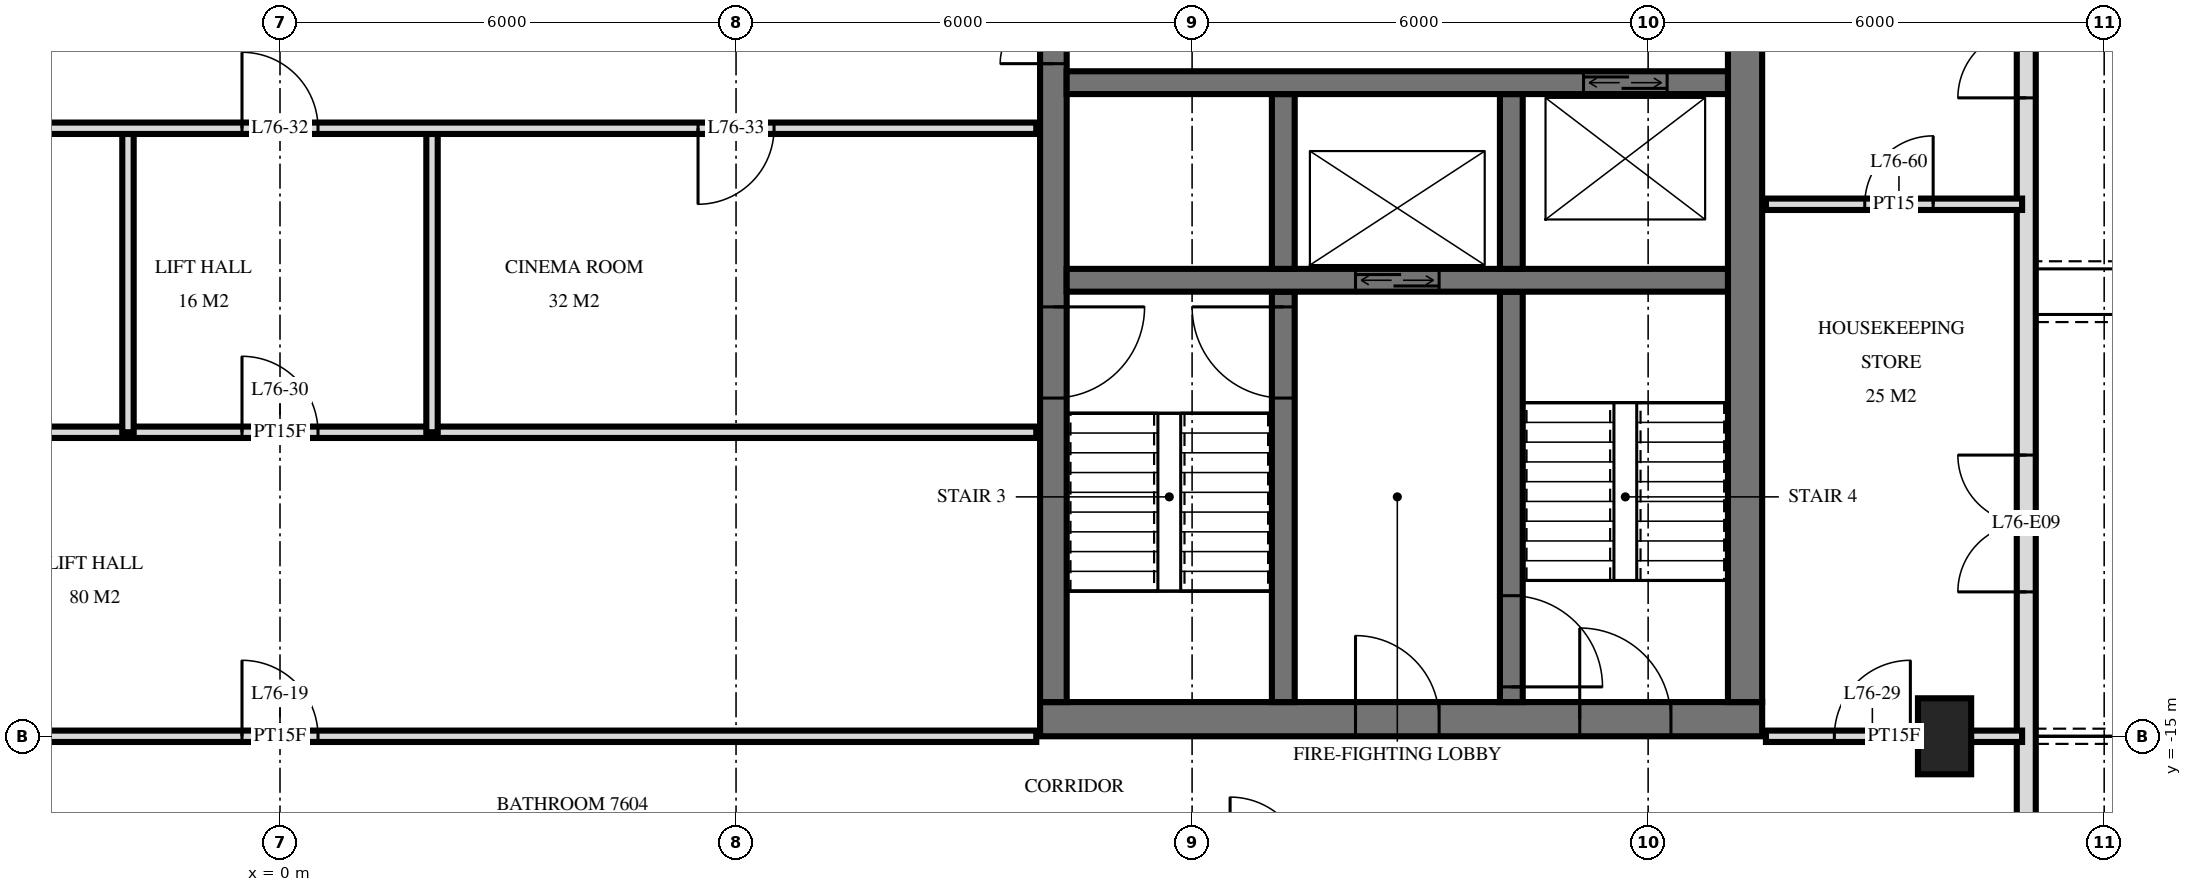
"""IFC4 building model, lengths in metres.
Left out: names, types, materials, properties, quantities, classifications, styles, units other than length and angle.
Written with IfcOpenShell. Run it as: python <this file> out.ifc"""

import sys

from ifc_helpers import new_model, si_unit, direction, frame, frame_2d, origin, origin_2d, place, context, subcontext, project, spatial, rectangle, extrude, element, fill, save


model = new_model("IFC4")
c1 = context("Model", 3, precision=1e-05, world=origin(), true_north=direction((0.0, 1.0)))
c2 = subcontext(c1, "Body", "Model", "MODEL_VIEW")
j1 = project(units=[si_unit("LENGTHUNIT", "METRE"), si_unit("PLANEANGLEUNIT", "RADIAN")], contexts=[c1])
p1 = place(None, origin())
s1 = spatial("IfcSite", under=j1, at=p1, CompositionType="ELEMENT")
p2 = place(p1, origin())
s2 = spatial("IfcBuilding", under=s1, at=p2, CompositionType="ELEMENT")
p3 = place(p2, frame((0.0, 0.0, 287.6)))
s3 = spatial("IfcBuildingStorey", under=s2, at=p3, CompositionType="ELEMENT", Elevation=287.6)
p4 = place(p3, frame((21.9, -15.0, 0.0), z_axis=(0.0, 0.0, 1.0), x_axis=(0.0, 1.0, 0.0)))
e1 = element("IfcColumn", 1, at=p4, inside=s3, PredefinedType="COLUMN", context=c2, shape_type="SweptSolid", body=[
    extrude(rectangle(XDim=1.0, YDim=0.7, at=origin_2d()), origin(), (0.0, 0.0, 1.0), 3.5),
])
p5 = place(p3, frame((10.0, -14.775, 0.0), z_axis=(0.0, 0.0, 1.0), x_axis=(1.0, 0.0, 0.0)))
e2 = element("IfcWall", 2, at=p5, inside=s3, PredefinedType="SHEAR", context=c2, shape_type="SweptSolid", body=[
    extrude(rectangle(XDim=9.5, YDim=0.45, at=frame_2d((4.75, 0.0))), origin(), (0.0, 0.0, 1.0), 3.5),
])
p6 = place(p5, frame((7.1, 0.0, 0.0)))
e3 = element("IfcOpeningElement", 3, at=p6, cuts=e2, PredefinedType="OPENING", context=c2, shape_type="SweptSolid", body=[
    extrude(rectangle(XDim=1.2, YDim=2.1, at=frame_2d((0.6, 1.05))), frame((0.0, 0.235, 0.0), z_axis=(0.0, -1.0, 0.0), x_axis=(1.0, 0.0, 0.0)), (0.0, 0.0, 1.0), 0.47),
])
p7 = place(p5, frame((4.15, 0.0, 0.0)))
e4 = element("IfcOpeningElement", 4, at=p7, cuts=e2, PredefinedType="OPENING", context=c2, shape_type="SweptSolid", body=[
    extrude(rectangle(XDim=1.1, YDim=2.1, at=frame_2d((0.55, 1.05))), frame((0.0, 0.235, 0.0), z_axis=(0.0, -1.0, 0.0), x_axis=(1.0, 0.0, 0.0)), (0.0, 0.0, 1.0), 0.47),
])
p8 = place(p3, frame((10.175, -14.55, 0.0), z_axis=(0.0, 0.0, 1.0), x_axis=(0.0, 1.0, 0.0)))
e5 = element("IfcWall", 5, at=p8, inside=s3, PredefinedType="SHEAR", context=c2, shape_type="SweptSolid", body=[
    extrude(rectangle(XDim=14.1, YDim=0.35, at=frame_2d((7.05, 0.0))), origin(), (0.0, 0.0, 1.0), 3.5),
])
p9 = place(p8, frame((8.4, 0.0, 0.0)))
e6 = element("IfcOpeningElement", 6, at=p9, cuts=e5, PredefinedType="OPENING", context=c2, shape_type="SweptSolid", body=[
    extrude(rectangle(XDim=1.4, YDim=2.4, at=frame_2d((0.7, 1.2))), frame((0.0, 0.185, 0.0), z_axis=(0.0, -1.0, 0.0), x_axis=(1.0, 0.0, 0.0)), (0.0, 0.0, 1.0), 0.37),
])
p10 = place(p8, frame((10.0, 0.0, 0.0)))
e7 = element("IfcOpeningElement", 7, at=p10, cuts=e5, PredefinedType="OPENING", context=c2, shape_type="SweptSolid", body=[
    extrude(rectangle(XDim=1.4, YDim=2.4, at=frame_2d((0.7, 1.2))), frame((0.0, 0.185, 0.0), z_axis=(0.0, -1.0, 0.0), x_axis=(1.0, 0.0, 0.0)), (0.0, 0.0, 1.0), 0.37),
])
p11 = place(p8, frame((4.0, 0.0, 0.0)))
e8 = element("IfcOpeningElement", 8, at=p11, cuts=e5, PredefinedType="OPENING", context=c2, shape_type="SweptSolid", body=[
    extrude(rectangle(XDim=1.2, YDim=2.1, at=frame_2d((0.6, 1.05))), frame((0.0, 0.185, 0.0), z_axis=(0.0, -1.0, 0.0), x_axis=(1.0, 0.0, 0.0)), (0.0, 0.0, 1.0), 0.37),
])
p12 = place(p3, frame((19.275, -14.55, 0.0), z_axis=(0.0, 0.0, 1.0), x_axis=(0.0, 1.0, 0.0)))
e9 = element("IfcWall", 9, at=p12, inside=s3, PredefinedType="SHEAR", context=c2, shape_type="SweptSolid", body=[
    extrude(rectangle(XDim=14.1, YDim=0.45, at=frame_2d((7.05, 0.0))), origin(), (0.0, 0.0, 1.0), 3.5),
])
p13 = place(p3, frame((10.35, -6.4, 0.0), z_axis=(0.0, 0.0, 1.0), x_axis=(1.0, 0.0, 0.0)))
e10 = element("IfcWall", 10, at=p13, inside=s3, PredefinedType="SHEAR", context=c2, shape_type="SweptSolid", body=[
    extrude(rectangle(XDim=8.7, YDim=0.3, at=frame_2d((4.35, 0.0))), origin(), (0.0, 0.0, 1.0), 3.5),
])
p14 = place(p13, frame((6.8, 0.0, 0.0)))
e11 = element("IfcOpeningElement", 11, at=p14, cuts=e10, PredefinedType="OPENING", context=c2, shape_type="SweptSolid", body=[
    extrude(rectangle(XDim=1.1, YDim=2.1, at=frame_2d((0.55, 1.05))), frame((0.0, 0.16, 0.0), z_axis=(0.0, -1.0, 0.0), x_axis=(1.0, 0.0, 0.0)), (0.0, 0.0, 1.0), 0.32),
])
p15 = place(p3, frame((10.35, -9.0, 0.0), z_axis=(0.0, 0.0, 1.0), x_axis=(1.0, 0.0, 0.0)))
e12 = element("IfcWall", 12, at=p15, inside=s3, PredefinedType="SHEAR", context=c2, shape_type="SweptSolid", body=[
    extrude(rectangle(XDim=8.7, YDim=0.3, at=frame_2d((4.35, 0.0))), origin(), (0.0, 0.0, 1.0), 3.5),
])
p16 = place(p15, frame((3.8, 0.0, 0.0)))
e13 = element("IfcOpeningElement", 13, at=p16, cuts=e12, PredefinedType="OPENING", context=c2, shape_type="SweptSolid", body=[
    extrude(rectangle(XDim=1.1, YDim=2.1, at=frame_2d((0.55, 1.05))), frame((0.0, 0.16, 0.0), z_axis=(0.0, -1.0, 0.0), x_axis=(1.0, 0.0, 0.0)), (0.0, 0.0, 1.0), 0.32),
])
p17 = place(p3, frame((13.2, -8.85, 0.0), z_axis=(0.0, 0.0, 1.0), x_axis=(0.0, 1.0, 0.0)))
e14 = element("IfcWall", 14, at=p17, inside=s3, PredefinedType="SHEAR", context=c2, shape_type="SweptSolid", body=[
    extrude(rectangle(XDim=2.3, YDim=0.3, at=frame_2d((1.15, 0.0))), origin(), (0.0, 0.0, 1.0), 3.5),
])
p18 = place(p3, frame((13.2, -14.55, 0.0), z_axis=(0.0, 0.0, 1.0), x_axis=(0.0, 1.0, 0.0)))
e15 = element("IfcWall", 15, at=p18, inside=s3, PredefinedType="SHEAR", context=c2, shape_type="SweptSolid", body=[
    extrude(rectangle(XDim=5.4, YDim=0.3, at=frame_2d((2.7, 0.0))), origin(), (0.0, 0.0, 1.0), 3.5),
])
p19 = place(p18, frame((4.0, 0.0, 0.0)))
e16 = element("IfcOpeningElement", 16, at=p19, cuts=e15, PredefinedType="OPENING", context=c2, shape_type="SweptSolid", body=[
    extrude(rectangle(XDim=1.2, YDim=2.1, at=frame_2d((0.6, 1.05))), frame((0.0, 0.16, 0.0), z_axis=(0.0, -1.0, 0.0), x_axis=(1.0, 0.0, 0.0)), (0.0, 0.0, 1.0), 0.32),
])
p20 = place(p3, frame((16.2, -8.85, 0.0), z_axis=(0.0, 0.0, 1.0), x_axis=(0.0, 1.0, 0.0)))
e17 = element("IfcWall", 17, at=p20, inside=s3, PredefinedType="SHEAR", context=c2, shape_type="SweptSolid", body=[
    extrude(rectangle(XDim=2.3, YDim=0.3, at=frame_2d((1.15, 0.0))), origin(), (0.0, 0.0, 1.0), 3.5),
])
p21 = place(p3, frame((16.2, -14.55, 0.0), z_axis=(0.0, 0.0, 1.0), x_axis=(0.0, 1.0, 0.0)))
e18 = element("IfcWall", 18, at=p21, inside=s3, PredefinedType="SHEAR", context=c2, shape_type="SweptSolid", body=[
    extrude(rectangle(XDim=5.4, YDim=0.3, at=frame_2d((2.7, 0.0))), origin(), (0.0, 0.0, 1.0), 3.5),
])
p22 = place(p21, frame((0.2, 0.0, 0.0)))
e19 = element("IfcOpeningElement", 19, at=p22, cuts=e18, PredefinedType="OPENING", context=c2, shape_type="SweptSolid", body=[
    extrude(rectangle(XDim=1.2, YDim=2.1, at=frame_2d((0.6, 1.05))), frame((0.0, 0.16, 0.0), z_axis=(0.0, -1.0, 0.0), x_axis=(1.0, 0.0, 0.0)), (0.0, 0.0, 1.0), 0.32),
])
p23 = place(p3, frame((22.975, -29.275, 0.0), z_axis=(0.0, 0.0, 1.0), x_axis=(0.0, 1.0, 0.0)))
e20 = element("IfcWall", 20, at=p23, inside=s3, PredefinedType="SOLIDWALL", context=c2, shape_type="SweptSolid", body=[
    extrude(rectangle(XDim=25.951, YDim=0.25, at=frame_2d((12.975, 0.0))), origin(), (0.0, 0.0, 1.0), 3.22),
])
p24 = place(p23, frame((0.575, 0.0, 0.0)))
e21 = element("IfcOpeningElement", 21, at=p24, cuts=e20, PredefinedType="OPENING", context=c2, shape_type="SweptSolid", body=[
    extrude(rectangle(XDim=1.8, YDim=2.4, at=frame_2d((0.9, 1.2))), frame((0.0, 0.135, 0.0), z_axis=(0.0, -1.0, 0.0), x_axis=(1.0, 0.0, 0.0)), (0.0, 0.0, 1.0), 0.27),
])
p25 = place(p23, frame((3.325, 0.0, 0.9)))
e22 = element("IfcOpeningElement", 22, at=p25, cuts=e20, PredefinedType="OPENING", context=c2, shape_type="SweptSolid", body=[
    extrude(rectangle(XDim=1.8, YDim=1.5, at=frame_2d((0.9, 0.75))), frame((0.0, 0.135, 0.0), z_axis=(0.0, -1.0, 0.0), x_axis=(1.0, 0.0, 0.0)), (0.0, 0.0, 1.0), 0.27),
])
p26 = place(p23, frame((9.475, 0.0, 0.0)))
e23 = element("IfcOpeningElement", 23, at=p26, cuts=e20, PredefinedType="OPENING", context=c2, shape_type="SweptSolid", body=[
    extrude(rectangle(XDim=1.8, YDim=2.4, at=frame_2d((0.9, 1.2))), frame((0.0, 0.135, 0.0), z_axis=(0.0, -1.0, 0.0), x_axis=(1.0, 0.0, 0.0)), (0.0, 0.0, 1.0), 0.27),
])
p27 = place(p23, frame((16.175, 0.0, 0.0)))
e24 = element("IfcOpeningElement", 24, at=p27, cuts=e20, PredefinedType="OPENING", context=c2, shape_type="SweptSolid", body=[
    extrude(rectangle(XDim=1.8, YDim=2.4, at=frame_2d((0.9, 1.2))), frame((0.0, 0.135, 0.0), z_axis=(0.0, -1.0, 0.0), x_axis=(1.0, 0.0, 0.0)), (0.0, 0.0, 1.0), 0.27),
])
p28 = place(p23, frame((22.675, 0.0, 0.0)))
e25 = element("IfcOpeningElement", 25, at=p28, cuts=e20, PredefinedType="OPENING", context=c2, shape_type="SweptSolid", body=[
    extrude(rectangle(XDim=1.8, YDim=2.4, at=frame_2d((0.9, 1.2))), frame((0.0, 0.135, 0.0), z_axis=(0.0, -1.0, 0.0), x_axis=(1.0, 0.0, 0.0)), (0.0, 0.0, 1.0), 0.27),
])
for number, where, z_axis, x_axis in (
    (26, (2.0, -11.0, 0.0), (0.0, 0.0, 1.0), (0.0, 1.0, 0.0)),
    (27, (-2.0, -11.0, 0.0), (0.0, 0.0, 1.0), (0.0, 1.0, 0.0)),
):
    element("IfcWall", number, at=place(p3, frame(where, z_axis=z_axis, x_axis=x_axis)), inside=s3, PredefinedType="PARTITIONING", context=c2, shape_type="SweptSolid", body=[
        extrude(rectangle(XDim=4.0, YDim=0.15, at=frame_2d((2.0, 0.0))), origin(), (0.0, 0.0, 1.0), 3.22),
    ])
p29 = place(p3, frame((-9.95, -15.0, 0.0), z_axis=(0.0, 0.0, 1.0), x_axis=(1.0, 0.0, 0.0)))
e28 = element("IfcWall", 28, at=p29, inside=s3, PredefinedType="PARTITIONING", context=c2, shape_type="SweptSolid", body=[
    extrude(rectangle(XDim=19.9, YDim=0.15, at=frame_2d((9.95, 0.0))), origin(), (0.0, 0.0, 1.0), 2.584),
])
p30 = place(p29, frame((9.45, 0.0, 0.0)))
e29 = element("IfcOpeningElement", 29, at=p30, cuts=e28, PredefinedType="OPENING", context=c2, shape_type="SweptSolid", body=[
    extrude(rectangle(XDim=1.0, YDim=2.1, at=frame_2d((0.5, 1.05))), frame((0.0, 0.085, 0.0), z_axis=(0.0, -1.0, 0.0), x_axis=(1.0, 0.0, 0.0)), (0.0, 0.0, 1.0), 0.17),
])
p31 = place(p3, frame((19.55, -15.0, 0.0), z_axis=(0.0, 0.0, 1.0), x_axis=(1.0, 0.0, 0.0)))
e30 = element("IfcWall", 30, at=p31, inside=s3, PredefinedType="PARTITIONING", context=c2, shape_type="SweptSolid", body=[
    extrude(rectangle(XDim=3.37, YDim=0.15, at=frame_2d((1.685, 0.0))), origin(), (0.0, 0.0, 1.0), 3.22),
])
p32 = place(p31, frame((0.9, 0.0, 0.0)))
e31 = element("IfcOpeningElement", 31, at=p32, cuts=e30, PredefinedType="OPENING", context=c2, shape_type="SweptSolid", body=[
    extrude(rectangle(XDim=1.0, YDim=2.1, at=frame_2d((0.5, 1.05))), frame((0.0, 0.085, 0.0), z_axis=(0.0, -1.0, 0.0), x_axis=(1.0, 0.0, 0.0)), (0.0, 0.0, 1.0), 0.17),
])
p33 = place(p3, frame((-9.95, -11.0, 0.0), z_axis=(0.0, 0.0, 1.0), x_axis=(1.0, 0.0, 0.0)))
e32 = element("IfcWall", 32, at=p33, inside=s3, PredefinedType="PARTITIONING", context=c2, shape_type="SweptSolid", body=[
    extrude(rectangle(XDim=19.9, YDim=0.15, at=frame_2d((9.95, 0.0))), origin(), (0.0, 0.0, 1.0), 3.22),
])
p34 = place(p33, frame((9.45, 0.0, 0.0)))
e33 = element("IfcOpeningElement", 33, at=p34, cuts=e32, PredefinedType="OPENING", context=c2, shape_type="SweptSolid", body=[
    extrude(rectangle(XDim=1.0, YDim=2.1, at=frame_2d((0.5, 1.05))), frame((0.0, 0.085, 0.0), z_axis=(0.0, -1.0, 0.0), x_axis=(1.0, 0.0, 0.0)), (0.0, 0.0, 1.0), 0.17),
])
p35 = place(p33, frame((3.45, 0.0, 0.0)))
e34 = element("IfcOpeningElement", 34, at=p35, cuts=e32, PredefinedType="OPENING", context=c2, shape_type="SweptSolid", body=[
    extrude(rectangle(XDim=1.0, YDim=2.1, at=frame_2d((0.5, 1.05))), frame((0.0, 0.085, 0.0), z_axis=(0.0, -1.0, 0.0), x_axis=(1.0, 0.0, 0.0)), (0.0, 0.0, 1.0), 0.17),
])
p36 = place(p3, frame((19.55, -8.0, 0.0), z_axis=(0.0, 0.0, 1.0), x_axis=(1.0, 0.0, 0.0)))
e35 = element("IfcWall", 35, at=p36, inside=s3, PredefinedType="PARTITIONING", context=c2, shape_type="SweptSolid", body=[
    extrude(rectangle(XDim=3.37, YDim=0.15, at=frame_2d((1.685, 0.0))), origin(), (0.0, 0.0, 1.0), 3.22),
])
p37 = place(p36, frame((1.3, 0.0, 0.0)))
e36 = element("IfcOpeningElement", 36, at=p37, cuts=e35, PredefinedType="OPENING", context=c2, shape_type="SweptSolid", body=[
    extrude(rectangle(XDim=0.9, YDim=2.1, at=frame_2d((0.45, 1.05))), frame((0.0, 0.085, 0.0), z_axis=(0.0, -1.0, 0.0), x_axis=(1.0, 0.0, 0.0)), (0.0, 0.0, 1.0), 0.17),
])
p38 = place(p3, frame((-9.95, -7.0, 0.0), z_axis=(0.0, 0.0, 1.0), x_axis=(1.0, 0.0, 0.0)))
e37 = element("IfcWall", 37, at=p38, inside=s3, PredefinedType="PARTITIONING", context=c2, shape_type="SweptSolid", body=[
    extrude(rectangle(XDim=19.9, YDim=0.15, at=frame_2d((9.95, 0.0))), origin(), (0.0, 0.0, 1.0), 3.22),
])
p39 = place(p38, frame((9.45, 0.0, 0.0)))
e38 = element("IfcOpeningElement", 38, at=p39, cuts=e37, PredefinedType="OPENING", context=c2, shape_type="SweptSolid", body=[
    extrude(rectangle(XDim=1.0, YDim=2.1, at=frame_2d((0.5, 1.05))), frame((0.0, 0.085, 0.0), z_axis=(0.0, -1.0, 0.0), x_axis=(1.0, 0.0, 0.0)), (0.0, 0.0, 1.0), 0.17),
])
p40 = place(p38, frame((15.45, 0.0, 0.0)))
e39 = element("IfcOpeningElement", 39, at=p40, cuts=e37, PredefinedType="OPENING", context=c2, shape_type="SweptSolid", body=[
    extrude(rectangle(XDim=1.0, YDim=2.1, at=frame_2d((0.5, 1.05))), frame((0.0, 0.085, 0.0), z_axis=(0.0, -1.0, 0.0), x_axis=(1.0, 0.0, 0.0)), (0.0, 0.0, 1.0), 0.17),
])
p41 = place(p27, origin())
e40 = element("IfcDoor", 40, at=p41, inside=s3, OperationType="DOUBLE_DOOR_SINGLE_SWING", PredefinedType="DOOR", context=c2, shape_type="SweptSolid", body=[
    extrude(rectangle(XDim=1.8, YDim=2.4, at=frame_2d((0.9, 1.2))), frame((0.0, 0.025, 0.0), z_axis=(0.0, -1.0, 0.0), x_axis=(1.0, 0.0, 0.0)), (0.0, 0.0, 1.0), 0.05),
])
fill(e24, e40)
p42 = place(p28, origin())
e41 = element("IfcDoor", 41, at=p42, inside=s3, OperationType="DOUBLE_DOOR_SINGLE_SWING", PredefinedType="DOOR", context=c2, shape_type="SweptSolid", body=[
    extrude(rectangle(XDim=1.8, YDim=2.4, at=frame_2d((0.9, 1.2))), frame((0.0, 0.025, 0.0), z_axis=(0.0, -1.0, 0.0), x_axis=(1.0, 0.0, 0.0)), (0.0, 0.0, 1.0), 0.05),
])
fill(e25, e41)
p43 = place(p16, origin())
e42 = element("IfcDoor", 42, at=p43, inside=s3, OperationType="DOUBLE_DOOR_SLIDING", PredefinedType="USERDEFINED", context=c2, shape_type="SweptSolid", body=[
    extrude(rectangle(XDim=1.1, YDim=2.1, at=frame_2d((0.55, 1.05))), frame((0.0, 0.025, 0.0), z_axis=(0.0, -1.0, 0.0), x_axis=(1.0, 0.0, 0.0)), (0.0, 0.0, 1.0), 0.05),
])
fill(e13, e42)
p44 = place(p14, origin())
e43 = element("IfcDoor", 43, at=p44, inside=s3, OperationType="DOUBLE_DOOR_SLIDING", PredefinedType="USERDEFINED", context=c2, shape_type="SweptSolid", body=[
    extrude(rectangle(XDim=1.1, YDim=2.1, at=frame_2d((0.55, 1.05))), frame((0.0, 0.025, 0.0), z_axis=(0.0, -1.0, 0.0), x_axis=(1.0, 0.0, 0.0)), (0.0, 0.0, 1.0), 0.05),
])
fill(e11, e43)
p45 = place(p9, origin())
e44 = element("IfcDoor", 44, at=p45, inside=s3, OperationType="DOUBLE_DOOR_SINGLE_SWING", PredefinedType="DOOR", context=c2, shape_type="SweptSolid", body=[
    extrude(rectangle(XDim=1.4, YDim=2.4, at=frame_2d((0.7, 1.2))), frame((0.0, 0.025, 0.0), z_axis=(0.0, -1.0, 0.0), x_axis=(1.0, 0.0, 0.0)), (0.0, 0.0, 1.0), 0.05),
])
fill(e6, e44)
p46 = place(p11, frame((0.6, 0.0, 0.0), z_axis=(0.0, 0.0, 1.0), x_axis=(-1.0, 0.0, 0.0)))
e45 = element("IfcDoor", 45, at=p46, inside=s3, OperationType="SINGLE_SWING_RIGHT", PredefinedType="DOOR", context=c2, shape_type="SweptSolid", body=[
    extrude(rectangle(XDim=1.2, YDim=2.1, at=frame_2d((0.0, 1.05))), frame((0.0, -0.025, 0.0), z_axis=(0.0, 1.0, 0.0), x_axis=(-1.0, 0.0, 0.0)), (0.0, 0.0, 1.0), 0.05),
])
fill(e8, e45)
p47 = place(p6, origin())
e46 = element("IfcDoor", 46, at=p47, inside=s3, OperationType="SINGLE_SWING_RIGHT", PredefinedType="DOOR", context=c2, shape_type="SweptSolid", body=[
    extrude(rectangle(XDim=1.2, YDim=2.1, at=frame_2d((0.6, 1.05))), frame((0.0, 0.025, 0.0), z_axis=(0.0, -1.0, 0.0), x_axis=(1.0, 0.0, 0.0)), (0.0, 0.0, 1.0), 0.05),
])
fill(e3, e46)
p48 = place(p7, origin())
e47 = element("IfcDoor", 47, at=p48, inside=s3, OperationType="SINGLE_SWING_RIGHT", PredefinedType="DOOR", context=c2, shape_type="SweptSolid", body=[
    extrude(rectangle(XDim=1.1, YDim=2.1, at=frame_2d((0.55, 1.05))), frame((0.0, 0.025, 0.0), z_axis=(0.0, -1.0, 0.0), x_axis=(1.0, 0.0, 0.0)), (0.0, 0.0, 1.0), 0.05),
])
fill(e4, e47)
p49 = place(p19, origin())
e48 = element("IfcDoor", 48, at=p49, inside=s3, OperationType="SINGLE_SWING_LEFT", PredefinedType="DOOR", context=c2, shape_type="SweptSolid", body=[
    extrude(rectangle(XDim=1.2, YDim=2.1, at=frame_2d((0.6, 1.05))), frame((0.0, 0.025, 0.0), z_axis=(0.0, -1.0, 0.0), x_axis=(1.0, 0.0, 0.0)), (0.0, 0.0, 1.0), 0.05),
])
fill(e16, e48)
p50 = place(p22, frame((0.6, 0.0, 0.0), z_axis=(0.0, 0.0, 1.0), x_axis=(-1.0, 0.0, 0.0)))
e49 = element("IfcDoor", 49, at=p50, inside=s3, OperationType="SINGLE_SWING_LEFT", PredefinedType="DOOR", context=c2, shape_type="SweptSolid", body=[
    extrude(rectangle(XDim=1.2, YDim=2.1, at=frame_2d((0.0, 1.05))), frame((0.0, -0.025, 0.0), z_axis=(0.0, 1.0, 0.0), x_axis=(-1.0, 0.0, 0.0)), (0.0, 0.0, 1.0), 0.05),
])
fill(e19, e49)
p51 = place(p30, origin())
e50 = element("IfcDoor", 50, at=p51, inside=s3, OperationType="SINGLE_SWING_RIGHT", PredefinedType="DOOR", context=c2, shape_type="SweptSolid", body=[
    extrude(rectangle(XDim=1.0, YDim=2.1, at=frame_2d((0.5, 1.05))), frame((0.0, 0.025, 0.0), z_axis=(0.0, -1.0, 0.0), x_axis=(1.0, 0.0, 0.0)), (0.0, 0.0, 1.0), 0.05),
])
fill(e29, e50)
p52 = place(p32, origin())
e51 = element("IfcDoor", 51, at=p52, inside=s3, OperationType="SINGLE_SWING_LEFT", PredefinedType="DOOR", context=c2, shape_type="SweptSolid", body=[
    extrude(rectangle(XDim=1.0, YDim=2.1, at=frame_2d((0.5, 1.05))), frame((0.0, 0.025, 0.0), z_axis=(0.0, -1.0, 0.0), x_axis=(1.0, 0.0, 0.0)), (0.0, 0.0, 1.0), 0.05),
])
fill(e31, e51)
p53 = place(p34, origin())
e52 = element("IfcDoor", 52, at=p53, inside=s3, OperationType="SINGLE_SWING_RIGHT", PredefinedType="DOOR", context=c2, shape_type="SweptSolid", body=[
    extrude(rectangle(XDim=1.0, YDim=2.1, at=frame_2d((0.5, 1.05))), frame((0.0, 0.025, 0.0), z_axis=(0.0, -1.0, 0.0), x_axis=(1.0, 0.0, 0.0)), (0.0, 0.0, 1.0), 0.05),
])
fill(e33, e52)
p54 = place(p39, origin())
e53 = element("IfcDoor", 53, at=p54, inside=s3, OperationType="SINGLE_SWING_RIGHT", PredefinedType="DOOR", context=c2, shape_type="SweptSolid", body=[
    extrude(rectangle(XDim=1.0, YDim=2.1, at=frame_2d((0.5, 1.05))), frame((0.0, 0.025, 0.0), z_axis=(0.0, -1.0, 0.0), x_axis=(1.0, 0.0, 0.0)), (0.0, 0.0, 1.0), 0.05),
])
fill(e38, e53)
p55 = place(p40, frame((0.5, 0.0, 0.0), z_axis=(0.0, 0.0, 1.0), x_axis=(-1.0, 0.0, 0.0)))
e54 = element("IfcDoor", 54, at=p55, inside=s3, OperationType="SINGLE_SWING_LEFT", PredefinedType="DOOR", context=c2, shape_type="SweptSolid", body=[
    extrude(rectangle(XDim=1.0, YDim=2.1, at=frame_2d((0.0, 1.05))), frame((0.0, -0.025, 0.0), z_axis=(0.0, 1.0, 0.0), x_axis=(-1.0, 0.0, 0.0)), (0.0, 0.0, 1.0), 0.05),
])
fill(e39, e54)
p56 = place(p37, origin())
e55 = element("IfcDoor", 55, at=p56, inside=s3, OperationType="SINGLE_SWING_LEFT", PredefinedType="DOOR", context=c2, shape_type="SweptSolid", body=[
    extrude(rectangle(XDim=0.9, YDim=2.1, at=frame_2d((0.45, 1.05))), frame((0.0, 0.025, 0.0), z_axis=(0.0, -1.0, 0.0), x_axis=(1.0, 0.0, 0.0)), (0.0, 0.0, 1.0), 0.05),
])
fill(e36, e55)
save(model, sys.argv[1])
